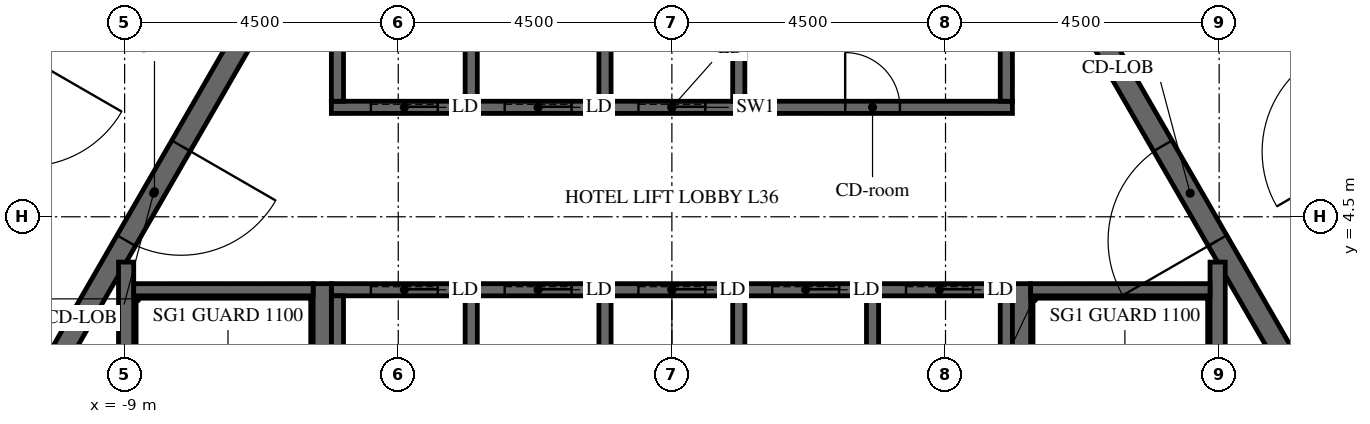
"""IFC4 building model, lengths in metres.
Left out: names, types, materials, properties, quantities, classifications, styles, units other than length and angle.
Written with IfcOpenShell. Run it as: python <this file> out.ifc"""

import sys

from ifc_helpers import new_model, si_unit, direction, frame, frame_2d, origin, place, context, subcontext, project, spatial, polyline, rectangle, outline, extrude, element, fill, save


model = new_model("IFC4")
c1 = context("Model", 3, precision=1e-05, world=origin(), true_north=direction((0.0, 1.0)))
c2 = subcontext(c1, "Body", "Model", "MODEL_VIEW")
j1 = project(units=[si_unit("LENGTHUNIT", "METRE"), si_unit("PLANEANGLEUNIT", "RADIAN")], contexts=[c1])
p1 = place(None, origin())
s1 = spatial("IfcSite", under=j1, at=p1, CompositionType="ELEMENT")
p2 = place(p1, origin())
s2 = spatial("IfcBuilding", under=s1, at=p2, CompositionType="ELEMENT")
p3 = place(p2, frame((0.0, 0.0, 156.6)))
s3 = spatial("IfcBuildingStorey", under=s2, at=p3, CompositionType="ELEMENT", Elevation=156.6)
p4 = place(p3, frame((-7.361, 12.75, -0.15), z_axis=(0.0, 0.0, 1.0), x_axis=(-0.50000571537, -0.866022103989, 0.0)))
e1 = element("IfcWall", 1, at=p4, inside=s3, PredefinedType="SHEAR", context=c2, shape_type="SweptSolid", body=[
    extrude(outline(polyline([(-0.144, -0.25), (14.867, -0.25), (14.578, 0.25), (0.144, 0.25), (-0.144, -0.25)])), origin(), (0.0, 0.0, 1.0), 3.9),
])
p5 = place(p4, frame((6.49, 0.0, 0.15)))
e2 = element("IfcOpeningElement", 2, at=p5, cuts=e1, PredefinedType="OPENING", context=c2, shape_type="SweptSolid", body=[
    extrude(rectangle(XDim=1.8, YDim=2.4, at=frame_2d((0.9, 1.2))), frame((0.0, 0.26, 0.0), z_axis=(0.0, -1.0, 0.0), x_axis=(1.0, 0.0, 0.0)), (0.0, 0.0, 1.0), 0.52),
])
p6 = place(p3, frame((14.722, 0.0, -0.15), z_axis=(0.0, 0.0, 1.0), x_axis=(-0.50000571537, 0.866022103989, 0.0)))
e3 = element("IfcWall", 3, at=p6, inside=s3, PredefinedType="SHEAR", context=c2, shape_type="SweptSolid", body=[
    extrude(outline(polyline([(-0.144, -0.25), (14.867, -0.25), (14.578, 0.25), (0.144, 0.25), (-0.144, -0.25)])), origin(), (0.0, 0.0, 1.0), 3.9),
])
p7 = place(p6, frame((6.432, 0.0, 0.15)))
e4 = element("IfcOpeningElement", 4, at=p7, cuts=e3, PredefinedType="OPENING", context=c2, shape_type="SweptSolid", body=[
    extrude(rectangle(XDim=1.8, YDim=2.4, at=frame_2d((0.9, 1.2))), frame((0.0, 0.26, 0.0), z_axis=(0.0, -1.0, 0.0), x_axis=(1.0, 0.0, 0.0)), (0.0, 0.0, 1.0), 0.52),
])
p8 = place(p3, frame((-5.673, 9.825, -0.15), z_axis=(0.0, 0.0, 1.0), x_axis=(-0.499995046907, -0.866028263435, 0.0)))
e5 = element("IfcWall", 5, at=p8, inside=s3, PredefinedType="SHEAR", context=c2, shape_type="SweptSolid", body=[
    extrude(outline(polyline([(-0.101, -0.175), (11.446, -0.175), (11.244, 0.175), (0.101, 0.175), (-0.101, -0.175)])), origin(), (0.0, 0.0, 1.0), 3.9),
])
p9 = place(p8, frame((4.801, 0.0, 0.15)))
e6 = element("IfcOpeningElement", 6, at=p9, cuts=e5, PredefinedType="OPENING", context=c2, shape_type="SweptSolid", body=[
    extrude(rectangle(XDim=1.8, YDim=2.4, at=frame_2d((0.9, 1.2))), frame((0.0, 0.185, 0.0), z_axis=(0.0, -1.0, 0.0), x_axis=(1.0, 0.0, 0.0)), (0.0, 0.0, 1.0), 0.37),
])
p10 = place(p3, frame((11.345, 0.0, -0.15), z_axis=(0.0, 0.0, 1.0), x_axis=(-0.499995046907, 0.866028263435, 0.0)))
e7 = element("IfcWall", 7, at=p10, inside=s3, PredefinedType="SHEAR", context=c2, shape_type="SweptSolid", body=[
    extrude(outline(polyline([(-0.101, -0.175), (11.446, -0.175), (11.244, 0.175), (0.101, 0.175), (-0.101, -0.175)])), origin(), (0.0, 0.0, 1.0), 3.9),
])
p11 = place(p10, frame((4.744, 0.0, 0.15)))
e8 = element("IfcOpeningElement", 8, at=p11, cuts=e7, PredefinedType="OPENING", context=c2, shape_type="SweptSolid", body=[
    extrude(rectangle(XDim=1.8, YDim=2.4, at=frame_2d((0.9, 1.2))), frame((0.0, 0.185, 0.0), z_axis=(0.0, -1.0, 0.0), x_axis=(1.0, 0.0, 0.0)), (0.0, 0.0, 1.0), 0.37),
])
p12 = place(p3, frame((-5.6, 6.3, -0.25), z_axis=(0.0, 0.0, 1.0), x_axis=(1.0, 0.0, 0.0)))
e9 = element("IfcWall", 9, at=p12, inside=s3, PredefinedType="SHEAR", context=c2, shape_type="SweptSolid", body=[
    extrude(rectangle(XDim=11.2, YDim=0.2, at=frame_2d((5.6, 0.0))), origin(), (0.0, 0.0, 1.0), 3.9),
])
p13 = place(p12, frame((8.45, 0.0, 0.25)))
e10 = element("IfcOpeningElement", 10, at=p13, cuts=e9, PredefinedType="OPENING", context=c2, shape_type="SweptSolid", body=[
    extrude(rectangle(XDim=0.9, YDim=2.1, at=frame_2d((0.45, 1.05))), frame((0.0, 0.11, 0.0), z_axis=(0.0, -1.0, 0.0), x_axis=(1.0, 0.0, 0.0)), (0.0, 0.0, 1.0), 0.22),
])
p14 = place(p12, frame((0.65, 0.0, 0.25)))
e11 = element("IfcOpeningElement", 11, at=p14, cuts=e9, PredefinedType="OPENING", context=c2, shape_type="SweptSolid", body=[
    extrude(rectangle(XDim=1.1, YDim=2.1, at=frame_2d((0.55, 1.05))), frame((0.0, 0.11, 0.0), z_axis=(0.0, -1.0, 0.0), x_axis=(1.0, 0.0, 0.0)), (0.0, 0.0, 1.0), 0.22),
])
p15 = place(p12, frame((2.85, 0.0, 0.25)))
e12 = element("IfcOpeningElement", 12, at=p15, cuts=e9, PredefinedType="OPENING", context=c2, shape_type="SweptSolid", body=[
    extrude(rectangle(XDim=1.1, YDim=2.1, at=frame_2d((0.55, 1.05))), frame((0.0, 0.11, 0.0), z_axis=(0.0, -1.0, 0.0), x_axis=(1.0, 0.0, 0.0)), (0.0, 0.0, 1.0), 0.22),
])
p16 = place(p12, frame((5.05, 0.0, 0.25)))
e13 = element("IfcOpeningElement", 13, at=p16, cuts=e9, PredefinedType="OPENING", context=c2, shape_type="SweptSolid", body=[
    extrude(rectangle(XDim=1.1, YDim=2.1, at=frame_2d((0.55, 1.05))), frame((0.0, 0.11, 0.0), z_axis=(0.0, -1.0, 0.0), x_axis=(1.0, 0.0, 0.0)), (0.0, 0.0, 1.0), 0.22),
])
for number, where, z_axis, x_axis in (
    (14, (-5.5, 6.4, -0.25), (0.0, 0.0, 1.0), (0.0, 1.0, 0.0)),
    (15, (-3.3, 6.4, -0.25), (0.0, 0.0, 1.0), (0.0, 1.0, 0.0)),
    (16, (-1.1, 6.4, -0.25), (0.0, 0.0, 1.0), (0.0, 1.0, 0.0)),
    (17, (1.1, 6.4, -0.25), (0.0, 0.0, 1.0), (0.0, 1.0, 0.0)),
    (18, (5.5, 6.4, -0.25), (0.0, 0.0, 1.0), (0.0, 1.0, 0.0)),
):
    element("IfcWall", number, at=place(p3, frame(where, z_axis=z_axis, x_axis=x_axis)), inside=s3, PredefinedType="SHEAR", context=c2, shape_type="SweptSolid", body=[
        extrude(rectangle(XDim=2.9, YDim=0.2, at=frame_2d((1.45, 0.0))), origin(), (0.0, 0.0, 1.0), 3.9),
    ])
p17 = place(p3, frame((-5.6, 3.3, -0.25), z_axis=(0.0, 0.0, 1.0), x_axis=(1.0, 0.0, 0.0)))
e19 = element("IfcWall", 19, at=p17, inside=s3, PredefinedType="SHEAR", context=c2, shape_type="SweptSolid", body=[
    extrude(rectangle(XDim=11.2, YDim=0.2, at=frame_2d((5.6, 0.0))), origin(), (0.0, 0.0, 1.0), 3.9),
])
p18 = place(p17, frame((0.65, 0.0, 0.25)))
e20 = element("IfcOpeningElement", 20, at=p18, cuts=e19, PredefinedType="OPENING", context=c2, shape_type="SweptSolid", body=[
    extrude(rectangle(XDim=1.1, YDim=2.1, at=frame_2d((0.55, 1.05))), frame((0.0, 0.11, 0.0), z_axis=(0.0, -1.0, 0.0), x_axis=(1.0, 0.0, 0.0)), (0.0, 0.0, 1.0), 0.22),
])
p19 = place(p17, frame((2.85, 0.0, 0.25)))
e21 = element("IfcOpeningElement", 21, at=p19, cuts=e19, PredefinedType="OPENING", context=c2, shape_type="SweptSolid", body=[
    extrude(rectangle(XDim=1.1, YDim=2.1, at=frame_2d((0.55, 1.05))), frame((0.0, 0.11, 0.0), z_axis=(0.0, -1.0, 0.0), x_axis=(1.0, 0.0, 0.0)), (0.0, 0.0, 1.0), 0.22),
])
p20 = place(p17, frame((5.05, 0.0, 0.25)))
e22 = element("IfcOpeningElement", 22, at=p20, cuts=e19, PredefinedType="OPENING", context=c2, shape_type="SweptSolid", body=[
    extrude(rectangle(XDim=1.1, YDim=2.1, at=frame_2d((0.55, 1.05))), frame((0.0, 0.11, 0.0), z_axis=(0.0, -1.0, 0.0), x_axis=(1.0, 0.0, 0.0)), (0.0, 0.0, 1.0), 0.22),
])
p21 = place(p17, frame((7.25, 0.0, 0.25)))
e23 = element("IfcOpeningElement", 23, at=p21, cuts=e19, PredefinedType="OPENING", context=c2, shape_type="SweptSolid", body=[
    extrude(rectangle(XDim=1.1, YDim=2.1, at=frame_2d((0.55, 1.05))), frame((0.0, 0.11, 0.0), z_axis=(0.0, -1.0, 0.0), x_axis=(1.0, 0.0, 0.0)), (0.0, 0.0, 1.0), 0.22),
])
p22 = place(p17, frame((9.45, 0.0, 0.25)))
e24 = element("IfcOpeningElement", 24, at=p22, cuts=e19, PredefinedType="OPENING", context=c2, shape_type="SweptSolid", body=[
    extrude(rectangle(XDim=1.1, YDim=2.1, at=frame_2d((0.55, 1.05))), frame((0.0, 0.11, 0.0), z_axis=(0.0, -1.0, 0.0), x_axis=(1.0, 0.0, 0.0)), (0.0, 0.0, 1.0), 0.22),
])
for number, where, z_axis, x_axis in (
    (25, (-5.5, 0.1, -0.25), (0.0, 0.0, 1.0), (0.0, 1.0, 0.0)),
    (26, (-3.3, 0.1, -0.25), (0.0, 0.0, 1.0), (0.0, 1.0, 0.0)),
    (27, (-1.1, 0.1, -0.25), (0.0, 0.0, 1.0), (0.0, 1.0, 0.0)),
    (28, (1.1, 0.1, -0.25), (0.0, 0.0, 1.0), (0.0, 1.0, 0.0)),
    (29, (3.3, 0.1, -0.25), (0.0, 0.0, 1.0), (0.0, 1.0, 0.0)),
    (30, (5.5, 0.1, -0.25), (0.0, 0.0, 1.0), (0.0, 1.0, 0.0)),
):
    element("IfcWall", number, at=place(p3, frame(where, z_axis=z_axis, x_axis=x_axis)), inside=s3, PredefinedType="SHEAR", context=c2, shape_type="SweptSolid", body=[
        extrude(rectangle(XDim=3.1, YDim=0.2, at=frame_2d((1.55, 0.0))), origin(), (0.0, 0.0, 1.0), 3.9),
    ])
p23 = place(p3, frame((5.75, -3.4, -0.25), z_axis=(0.0, 0.0, 1.0), x_axis=(0.0, 1.0, 0.0)))
e31 = element("IfcWall", 31, at=p23, inside=s3, PredefinedType="SHEAR", context=c2, shape_type="SweptSolid", body=[
    extrude(rectangle(XDim=6.8, YDim=0.3, at=frame_2d((3.4, 0.0))), origin(), (0.0, 0.0, 1.0), 3.9),
])
p24 = place(p3, frame((8.975, -3.755, -0.25), z_axis=(0.0, 0.0, 1.0), x_axis=(0.0, 1.0, 0.0)))
e32 = element("IfcWall", 32, at=p24, inside=s3, PredefinedType="SHEAR", context=c2, shape_type="SweptSolid", body=[
    extrude(rectangle(XDim=7.51, YDim=0.25, at=frame_2d((3.755, 0.0))), origin(), (0.0, 0.0, 1.0), 3.9),
])
p25 = place(p3, frame((5.9, 3.3, -0.25), z_axis=(0.0, 0.0, 1.0), x_axis=(1.0, 0.0, 0.0)))
e33 = element("IfcWall", 33, at=p25, inside=s3, PredefinedType="SHEAR", context=c2, shape_type="SweptSolid", body=[
    extrude(rectangle(XDim=2.95, YDim=0.2, at=frame_2d((1.475, 0.0))), origin(), (0.0, 0.0, 1.0), 3.9),
])
p26 = place(p3, frame((-5.75, -3.4, -0.25), z_axis=(0.0, 0.0, 1.0), x_axis=(0.0, 1.0, 0.0)))
e34 = element("IfcWall", 34, at=p26, inside=s3, PredefinedType="SHEAR", context=c2, shape_type="SweptSolid", body=[
    extrude(rectangle(XDim=6.8, YDim=0.3, at=frame_2d((3.4, 0.0))), origin(), (0.0, 0.0, 1.0), 3.9),
])
p27 = place(p3, frame((-8.975, -3.755, -0.25), z_axis=(0.0, 0.0, 1.0), x_axis=(0.0, 1.0, 0.0)))
e35 = element("IfcWall", 35, at=p27, inside=s3, PredefinedType="SHEAR", context=c2, shape_type="SweptSolid", body=[
    extrude(rectangle(XDim=7.51, YDim=0.25, at=frame_2d((3.755, 0.0))), origin(), (0.0, 0.0, 1.0), 3.9),
])
p28 = place(p3, frame((-8.85, 3.3, -0.25), z_axis=(0.0, 0.0, 1.0), x_axis=(1.0, 0.0, 0.0)))
e36 = element("IfcWall", 36, at=p28, inside=s3, PredefinedType="SHEAR", context=c2, shape_type="SweptSolid", body=[
    extrude(rectangle(XDim=2.95, YDim=0.2, at=frame_2d((1.475, 0.0))), origin(), (0.0, 0.0, 1.0), 3.9),
])
p29 = place(p3, frame((-8.588, 14.725, 0.0), z_axis=(0.0, 0.0, 1.0), x_axis=(-0.499996322767, -0.866027526826, 0.0)))
e37 = element("IfcWall", 37, at=p29, inside=s3, PredefinedType="PARTITIONING", context=c2, shape_type="SweptSolid", body=[
    extrude(rectangle(XDim=14.636, YDim=0.15, at=frame_2d((7.318, 0.0))), origin(), (0.0, 0.0, 1.0), 2.823),
])
p30 = place(p29, frame((0.936, 0.0, 0.0)))
e38 = element("IfcOpeningElement", 38, at=p30, cuts=e37, PredefinedType="OPENING", context=c2, shape_type="SweptSolid", body=[
    extrude(rectangle(XDim=1.0, YDim=2.1, at=frame_2d((0.5, 1.05))), frame((0.0, 0.085, 0.0), z_axis=(0.0, -1.0, 0.0), x_axis=(1.0, 0.0, 0.0)), (0.0, 0.0, 1.0), 0.17),
])
p31 = place(p29, frame((9.495, 0.0, 0.0)))
e39 = element("IfcOpeningElement", 39, at=p31, cuts=e37, PredefinedType="OPENING", context=c2, shape_type="SweptSolid", body=[
    extrude(rectangle(XDim=1.0, YDim=2.1, at=frame_2d((0.5, 1.05))), frame((0.0, 0.085, 0.0), z_axis=(0.0, -1.0, 0.0), x_axis=(1.0, 0.0, 0.0)), (0.0, 0.0, 1.0), 0.17),
])
p32 = place(p3, frame((17.046, 0.075, 0.0), z_axis=(0.0, 0.0, 1.0), x_axis=(-0.499999403554, 0.866025748143, 0.0)))
e40 = element("IfcWall", 40, at=p32, inside=s3, PredefinedType="PARTITIONING", context=c2, shape_type="SweptSolid", body=[
    extrude(rectangle(XDim=14.549, YDim=0.15, at=frame_2d((7.275, 0.0))), origin(), (0.0, 0.0, 1.0), 2.823),
])
p33 = place(p32, frame((1.781, 0.0, 0.0)))
e41 = element("IfcOpeningElement", 41, at=p33, cuts=e40, PredefinedType="OPENING", context=c2, shape_type="SweptSolid", body=[
    extrude(rectangle(XDim=1.0, YDim=2.1, at=frame_2d((0.5, 1.05))), frame((0.0, 0.085, 0.0), z_axis=(0.0, -1.0, 0.0), x_axis=(1.0, 0.0, 0.0)), (0.0, 0.0, 1.0), 0.17),
])
p34 = place(p32, frame((8.705, 0.0, 0.0)))
e42 = element("IfcOpeningElement", 42, at=p34, cuts=e40, PredefinedType="OPENING", context=c2, shape_type="SweptSolid", body=[
    extrude(rectangle(XDim=1.0, YDim=2.1, at=frame_2d((0.5, 1.05))), frame((0.0, 0.085, 0.0), z_axis=(0.0, -1.0, 0.0), x_axis=(1.0, 0.0, 0.0)), (0.0, 0.0, 1.0), 0.17),
])
p35 = place(p9, origin())
e43 = element("IfcDoor", 43, at=p35, inside=s3, OperationType="DOUBLE_DOOR_SINGLE_SWING", PredefinedType="DOOR", context=c2, shape_type="SweptSolid", body=[
    extrude(rectangle(XDim=1.8, YDim=2.4, at=frame_2d((0.9, 1.2))), frame((0.0, 0.025, 0.0), z_axis=(0.0, -1.0, 0.0), x_axis=(1.0, 0.0, 0.0)), (0.0, 0.0, 1.0), 0.05),
])
fill(e6, e43)
p36 = place(p11, origin())
e44 = element("IfcDoor", 44, at=p36, inside=s3, OperationType="DOUBLE_DOOR_SINGLE_SWING", PredefinedType="DOOR", context=c2, shape_type="SweptSolid", body=[
    extrude(rectangle(XDim=1.8, YDim=2.4, at=frame_2d((0.9, 1.2))), frame((0.0, 0.025, 0.0), z_axis=(0.0, -1.0, 0.0), x_axis=(1.0, 0.0, 0.0)), (0.0, 0.0, 1.0), 0.05),
])
fill(e8, e44)
p37 = place(p13, origin())
e45 = element("IfcDoor", 45, at=p37, inside=s3, OperationType="SINGLE_SWING_LEFT", PredefinedType="DOOR", context=c2, shape_type="SweptSolid", body=[
    extrude(rectangle(XDim=0.9, YDim=2.1, at=frame_2d((0.45, 1.05))), frame((0.0, 0.025, 0.0), z_axis=(0.0, -1.0, 0.0), x_axis=(1.0, 0.0, 0.0)), (0.0, 0.0, 1.0), 0.05),
])
fill(e10, e45)
p38 = place(p14, origin())
e46 = element("IfcDoor", 46, at=p38, inside=s3, OperationType="SLIDING_TO_LEFT", PredefinedType="DOOR", context=c2, shape_type="SweptSolid", body=[
    extrude(rectangle(XDim=1.1, YDim=2.1, at=frame_2d((0.55, 1.05))), frame((0.0, 0.025, 0.0), z_axis=(0.0, -1.0, 0.0), x_axis=(1.0, 0.0, 0.0)), (0.0, 0.0, 1.0), 0.05),
])
fill(e11, e46)
p39 = place(p15, origin())
e47 = element("IfcDoor", 47, at=p39, inside=s3, OperationType="SLIDING_TO_LEFT", PredefinedType="DOOR", context=c2, shape_type="SweptSolid", body=[
    extrude(rectangle(XDim=1.1, YDim=2.1, at=frame_2d((0.55, 1.05))), frame((0.0, 0.025, 0.0), z_axis=(0.0, -1.0, 0.0), x_axis=(1.0, 0.0, 0.0)), (0.0, 0.0, 1.0), 0.05),
])
fill(e12, e47)
p40 = place(p16, origin())
e48 = element("IfcDoor", 48, at=p40, inside=s3, OperationType="SLIDING_TO_LEFT", PredefinedType="DOOR", context=c2, shape_type="SweptSolid", body=[
    extrude(rectangle(XDim=1.1, YDim=2.1, at=frame_2d((0.55, 1.05))), frame((0.0, 0.025, 0.0), z_axis=(0.0, -1.0, 0.0), x_axis=(1.0, 0.0, 0.0)), (0.0, 0.0, 1.0), 0.05),
])
fill(e13, e48)
p41 = place(p18, origin())
e49 = element("IfcDoor", 49, at=p41, inside=s3, OperationType="SLIDING_TO_LEFT", PredefinedType="DOOR", context=c2, shape_type="SweptSolid", body=[
    extrude(rectangle(XDim=1.1, YDim=2.1, at=frame_2d((0.55, 1.05))), frame((0.0, 0.025, 0.0), z_axis=(0.0, -1.0, 0.0), x_axis=(1.0, 0.0, 0.0)), (0.0, 0.0, 1.0), 0.05),
])
fill(e20, e49)
p42 = place(p19, origin())
e50 = element("IfcDoor", 50, at=p42, inside=s3, OperationType="SLIDING_TO_LEFT", PredefinedType="DOOR", context=c2, shape_type="SweptSolid", body=[
    extrude(rectangle(XDim=1.1, YDim=2.1, at=frame_2d((0.55, 1.05))), frame((0.0, 0.025, 0.0), z_axis=(0.0, -1.0, 0.0), x_axis=(1.0, 0.0, 0.0)), (0.0, 0.0, 1.0), 0.05),
])
fill(e21, e50)
p43 = place(p20, origin())
e51 = element("IfcDoor", 51, at=p43, inside=s3, OperationType="SLIDING_TO_LEFT", PredefinedType="DOOR", context=c2, shape_type="SweptSolid", body=[
    extrude(rectangle(XDim=1.1, YDim=2.1, at=frame_2d((0.55, 1.05))), frame((0.0, 0.025, 0.0), z_axis=(0.0, -1.0, 0.0), x_axis=(1.0, 0.0, 0.0)), (0.0, 0.0, 1.0), 0.05),
])
fill(e22, e51)
p44 = place(p21, origin())
e52 = element("IfcDoor", 52, at=p44, inside=s3, OperationType="SLIDING_TO_LEFT", PredefinedType="DOOR", context=c2, shape_type="SweptSolid", body=[
    extrude(rectangle(XDim=1.1, YDim=2.1, at=frame_2d((0.55, 1.05))), frame((0.0, 0.025, 0.0), z_axis=(0.0, -1.0, 0.0), x_axis=(1.0, 0.0, 0.0)), (0.0, 0.0, 1.0), 0.05),
])
fill(e23, e52)
p45 = place(p22, origin())
e53 = element("IfcDoor", 53, at=p45, inside=s3, OperationType="SLIDING_TO_LEFT", PredefinedType="DOOR", context=c2, shape_type="SweptSolid", body=[
    extrude(rectangle(XDim=1.1, YDim=2.1, at=frame_2d((0.55, 1.05))), frame((0.0, 0.025, 0.0), z_axis=(0.0, -1.0, 0.0), x_axis=(1.0, 0.0, 0.0)), (0.0, 0.0, 1.0), 0.05),
])
fill(e24, e53)
save(model, sys.argv[1])
